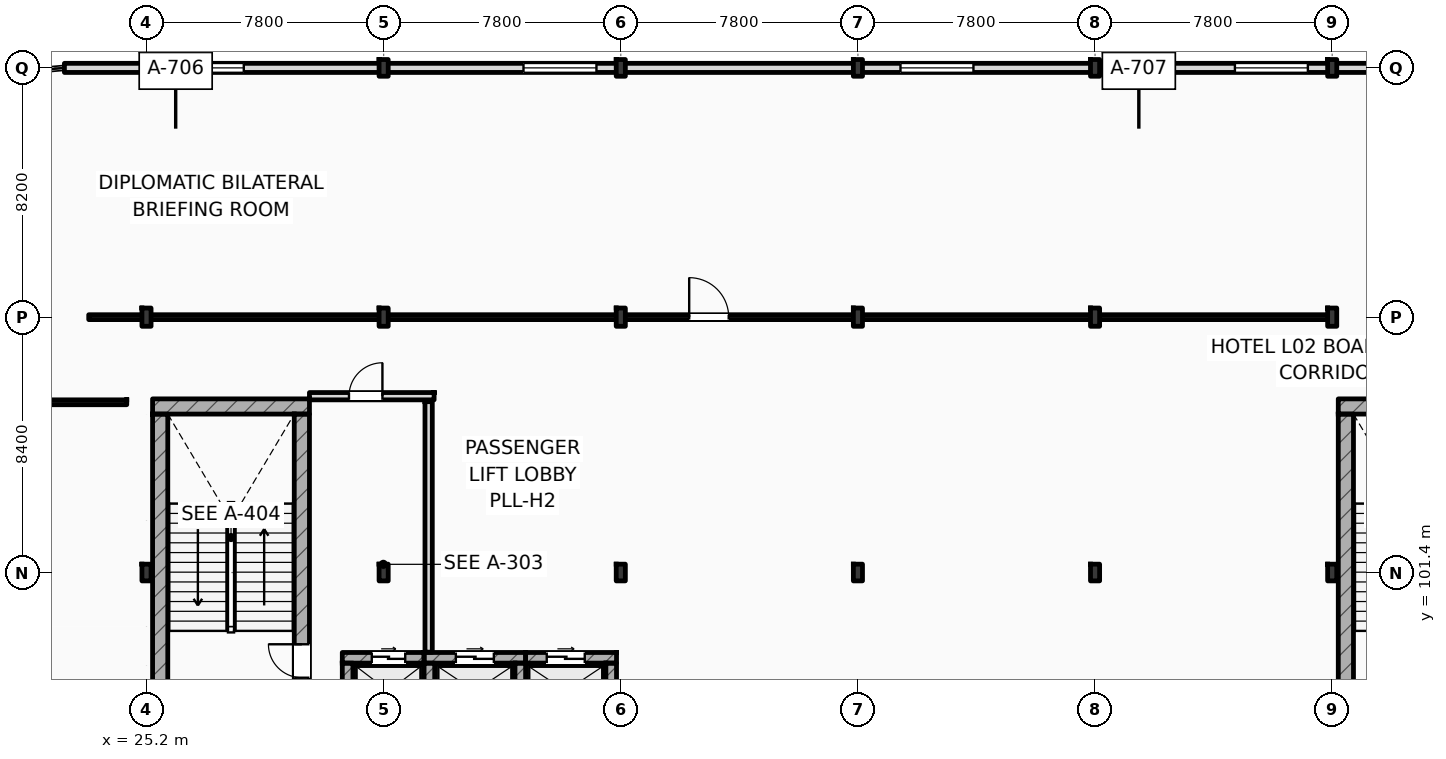
"""IFC4 building model, lengths in metres.
Left out: names, types, materials, properties, quantities, classifications, styles, units other than length and angle.
Written with IfcOpenShell. Run it as: python <this file> out.ifc"""

import sys

from ifc_helpers import new_model, si_unit, direction, frame, frame_2d, origin, origin_2d, place, context, subcontext, project, spatial, rectangle, i_section, extrude, element, fill, save


model = new_model("IFC4")
c1 = context("Model", 3, precision=1e-05, world=origin(), true_north=direction((0.0, 1.0)))
c2 = subcontext(c1, "Body", "Model", "MODEL_VIEW")
j1 = project(units=[si_unit("LENGTHUNIT", "METRE"), si_unit("PLANEANGLEUNIT", "RADIAN")], contexts=[c1])
p1 = place(None, origin())
s1 = spatial("IfcSite", under=j1, at=p1, CompositionType="ELEMENT")
p2 = place(p1, origin())
s2 = spatial("IfcBuilding", under=s1, at=p2, CompositionType="ELEMENT")
p3 = place(p2, frame((0.0, 0.0, 11.4)))
s3 = spatial("IfcBuildingStorey", under=s2, at=p3, CompositionType="ELEMENT", Elevation=11.4)
p4 = place(p3, frame((25.2, 101.4, 0.0), z_axis=(0.0, 0.0, 1.0), x_axis=(1.0, 0.0, 0.0)))
e1 = element("IfcColumn", 1, at=p4, inside=s3, PredefinedType="COLUMN", context=c2, shape_type="SweptSolid", body=[
    extrude(i_section(OverallWidth=0.3, OverallDepth=0.55, WebThickness=0.015, FlangeThickness=0.029, FilletRadius=0.027, at=origin_2d()), origin(), (0.0, 0.0, 1.0), 4.8),
])
p5 = place(p3, frame((25.2, 109.8, 0.0), z_axis=(0.0, 0.0, 1.0), x_axis=(1.0, 0.0, 0.0)))
e2 = element("IfcColumn", 2, at=p5, inside=s3, PredefinedType="COLUMN", context=c2, shape_type="SweptSolid", body=[
    extrude(i_section(OverallWidth=0.3, OverallDepth=0.6, WebThickness=0.015, FlangeThickness=0.03, FilletRadius=0.027, at=origin_2d()), origin(), (0.0, 0.0, 1.0), 4.8),
])
for number, where, z_axis, x_axis in (
    (3, (25.2, 118.0, 0.0), (0.0, 0.0, 1.0), (1.0, 0.0, 0.0)),
    (4, (33.0, 101.4, 0.0), (0.0, 0.0, 1.0), (1.0, 0.0, 0.0)),
):
    element("IfcColumn", number, at=place(p3, frame(where, z_axis=z_axis, x_axis=x_axis)), inside=s3, PredefinedType="COLUMN", context=c2, shape_type="SweptSolid", body=[
        extrude(i_section(OverallWidth=0.3, OverallDepth=0.55, WebThickness=0.015, FlangeThickness=0.029, FilletRadius=0.027, at=origin_2d()), origin(), (0.0, 0.0, 1.0), 4.8),
    ])
p6 = place(p3, frame((33.0, 109.8, 0.0), z_axis=(0.0, 0.0, 1.0), x_axis=(1.0, 0.0, 0.0)))
e5 = element("IfcColumn", 5, at=p6, inside=s3, PredefinedType="COLUMN", context=c2, shape_type="SweptSolid", body=[
    extrude(i_section(OverallWidth=0.3, OverallDepth=0.6, WebThickness=0.015, FlangeThickness=0.03, FilletRadius=0.027, at=origin_2d()), origin(), (0.0, 0.0, 1.0), 4.8),
])
for number, where, z_axis, x_axis in (
    (6, (33.0, 118.0, 0.0), (0.0, 0.0, 1.0), (1.0, 0.0, 0.0)),
    (7, (40.8, 101.4, 0.0), (0.0, 0.0, 1.0), (1.0, 0.0, 0.0)),
):
    element("IfcColumn", number, at=place(p3, frame(where, z_axis=z_axis, x_axis=x_axis)), inside=s3, PredefinedType="COLUMN", context=c2, shape_type="SweptSolid", body=[
        extrude(i_section(OverallWidth=0.3, OverallDepth=0.55, WebThickness=0.015, FlangeThickness=0.029, FilletRadius=0.027, at=origin_2d()), origin(), (0.0, 0.0, 1.0), 4.8),
    ])
p7 = place(p3, frame((40.8, 109.8, 0.0), z_axis=(0.0, 0.0, 1.0), x_axis=(1.0, 0.0, 0.0)))
e8 = element("IfcColumn", 8, at=p7, inside=s3, PredefinedType="COLUMN", context=c2, shape_type="SweptSolid", body=[
    extrude(i_section(OverallWidth=0.3, OverallDepth=0.6, WebThickness=0.015, FlangeThickness=0.03, FilletRadius=0.027, at=origin_2d()), origin(), (0.0, 0.0, 1.0), 4.8),
])
for number, where, z_axis, x_axis in (
    (9, (40.8, 118.0, 0.0), (0.0, 0.0, 1.0), (1.0, 0.0, 0.0)),
    (10, (48.6, 101.4, 0.0), (0.0, 0.0, 1.0), (1.0, 0.0, 0.0)),
):
    element("IfcColumn", number, at=place(p3, frame(where, z_axis=z_axis, x_axis=x_axis)), inside=s3, PredefinedType="COLUMN", context=c2, shape_type="SweptSolid", body=[
        extrude(i_section(OverallWidth=0.3, OverallDepth=0.55, WebThickness=0.015, FlangeThickness=0.029, FilletRadius=0.027, at=origin_2d()), origin(), (0.0, 0.0, 1.0), 4.8),
    ])
p8 = place(p3, frame((48.6, 109.8, 0.0), z_axis=(0.0, 0.0, 1.0), x_axis=(1.0, 0.0, 0.0)))
e11 = element("IfcColumn", 11, at=p8, inside=s3, PredefinedType="COLUMN", context=c2, shape_type="SweptSolid", body=[
    extrude(i_section(OverallWidth=0.3, OverallDepth=0.6, WebThickness=0.015, FlangeThickness=0.03, FilletRadius=0.027, at=origin_2d()), origin(), (0.0, 0.0, 1.0), 4.8),
])
for number, where, z_axis, x_axis in (
    (12, (48.6, 118.0, 0.0), (0.0, 0.0, 1.0), (1.0, 0.0, 0.0)),
    (13, (56.4, 101.4, 0.0), (0.0, 0.0, 1.0), (1.0, 0.0, 0.0)),
):
    element("IfcColumn", number, at=place(p3, frame(where, z_axis=z_axis, x_axis=x_axis)), inside=s3, PredefinedType="COLUMN", context=c2, shape_type="SweptSolid", body=[
        extrude(i_section(OverallWidth=0.3, OverallDepth=0.55, WebThickness=0.015, FlangeThickness=0.029, FilletRadius=0.027, at=origin_2d()), origin(), (0.0, 0.0, 1.0), 4.8),
    ])
p9 = place(p3, frame((56.4, 109.8, 0.0), z_axis=(0.0, 0.0, 1.0), x_axis=(1.0, 0.0, 0.0)))
e14 = element("IfcColumn", 14, at=p9, inside=s3, PredefinedType="COLUMN", context=c2, shape_type="SweptSolid", body=[
    extrude(i_section(OverallWidth=0.3, OverallDepth=0.6, WebThickness=0.015, FlangeThickness=0.03, FilletRadius=0.027, at=origin_2d()), origin(), (0.0, 0.0, 1.0), 4.8),
])
for number, where, z_axis, x_axis in (
    (15, (56.4, 118.0, 0.0), (0.0, 0.0, 1.0), (1.0, 0.0, 0.0)),
    (16, (64.2, 101.4, 0.0), (0.0, 0.0, 1.0), (1.0, 0.0, 0.0)),
):
    element("IfcColumn", number, at=place(p3, frame(where, z_axis=z_axis, x_axis=x_axis)), inside=s3, PredefinedType="COLUMN", context=c2, shape_type="SweptSolid", body=[
        extrude(i_section(OverallWidth=0.3, OverallDepth=0.55, WebThickness=0.015, FlangeThickness=0.029, FilletRadius=0.027, at=origin_2d()), origin(), (0.0, 0.0, 1.0), 4.8),
    ])
p10 = place(p3, frame((64.2, 109.8, 0.0), z_axis=(0.0, 0.0, 1.0), x_axis=(1.0, 0.0, 0.0)))
e17 = element("IfcColumn", 17, at=p10, inside=s3, PredefinedType="COLUMN", context=c2, shape_type="SweptSolid", body=[
    extrude(i_section(OverallWidth=0.3, OverallDepth=0.6, WebThickness=0.015, FlangeThickness=0.03, FilletRadius=0.027, at=origin_2d()), origin(), (0.0, 0.0, 1.0), 4.8),
])
p11 = place(p3, frame((64.2, 118.0, 0.0), z_axis=(0.0, 0.0, 1.0), x_axis=(1.0, 0.0, 0.0)))
e18 = element("IfcColumn", 18, at=p11, inside=s3, PredefinedType="COLUMN", context=c2, shape_type="SweptSolid", body=[
    extrude(i_section(OverallWidth=0.3, OverallDepth=0.55, WebThickness=0.015, FlangeThickness=0.029, FilletRadius=0.027, at=origin_2d()), origin(), (0.0, 0.0, 1.0), 4.8),
])
p12 = place(p3, frame((25.4, 106.862, 0.0), z_axis=(0.0, 0.0, 1.0), x_axis=(1.0, 0.0, 0.0)))
e19 = element("IfcWall", 19, at=p12, inside=s3, PredefinedType="SHEAR", context=c2, shape_type="SweptSolid", body=[
    extrude(rectangle(XDim=5.16, YDim=0.5, at=frame_2d((2.58, 0.0))), origin(), (0.0, 0.0, 1.0), 4.8),
])
p13 = place(p3, frame((25.65, 97.5, 0.0), z_axis=(0.0, 0.0, 1.0), x_axis=(0.0, 1.0, 0.0)))
e20 = element("IfcWall", 20, at=p13, inside=s3, PredefinedType="SHEAR", context=c2, shape_type="SweptSolid", body=[
    extrude(rectangle(XDim=9.112, YDim=0.5, at=frame_2d((4.556, 0.0))), origin(), (0.0, 0.0, 1.0), 4.8),
])
p14 = place(p3, frame((30.31, 97.5, 0.0), z_axis=(0.0, 0.0, 1.0), x_axis=(0.0, 1.0, 0.0)))
e21 = element("IfcWall", 21, at=p14, inside=s3, PredefinedType="SHEAR", context=c2, shape_type="SweptSolid", body=[
    extrude(rectangle(XDim=9.112, YDim=0.5, at=frame_2d((4.556, 0.0))), origin(), (0.0, 0.0, 1.0), 4.8),
])
p15 = place(p14, frame((0.44, 0.0, 0.0)))
e22 = element("IfcOpeningElement", 22, at=p15, cuts=e21, PredefinedType="OPENING", context=c2, shape_type="SweptSolid", body=[
    extrude(rectangle(XDim=1.1, YDim=2.2, at=frame_2d((0.55, 1.1))), frame((0.0, 0.26, 0.0), z_axis=(0.0, -1.0, 0.0), x_axis=(1.0, 0.0, 0.0)), (0.0, 0.0, 1.0), 0.52),
])
p16 = place(p3, frame((64.4, 106.862, 0.0), z_axis=(0.0, 0.0, 1.0), x_axis=(1.0, 0.0, 0.0)))
e23 = element("IfcWall", 23, at=p16, inside=s3, PredefinedType="SHEAR", context=c2, shape_type="SweptSolid", body=[
    extrude(rectangle(XDim=5.16, YDim=0.5, at=frame_2d((2.58, 0.0))), origin(), (0.0, 0.0, 1.0), 4.8),
])
p17 = place(p3, frame((64.65, 97.5, 0.0), z_axis=(0.0, 0.0, 1.0), x_axis=(0.0, 1.0, 0.0)))
e24 = element("IfcWall", 24, at=p17, inside=s3, PredefinedType="SHEAR", context=c2, shape_type="SweptSolid", body=[
    extrude(rectangle(XDim=9.112, YDim=0.5, at=frame_2d((4.556, 0.0))), origin(), (0.0, 0.0, 1.0), 4.8),
])
p18 = place(p3, frame((22.5, 118.0, 0.0), z_axis=(0.0, 0.0, 1.0), x_axis=(1.0, 0.0, 0.0)))
e25 = element("IfcWall", 25, at=p18, inside=s3, PredefinedType="STANDARD", context=c2, shape_type="SweptSolid", body=[
    extrude(rectangle(XDim=97.5, YDim=0.3, at=frame_2d((48.75, 0.0))), origin(), (0.0, 0.0, 1.0), 3.96),
])
p19 = place(p18, frame((3.5, 0.0, 0.95)))
e26 = element("IfcOpeningElement", 26, at=p19, cuts=e25, PredefinedType="OPENING", context=c2, shape_type="SweptSolid", body=[
    extrude(rectangle(XDim=2.4, YDim=2.4, at=frame_2d((1.2, 1.2))), frame((0.0, 0.16, 0.0), z_axis=(0.0, -1.0, 0.0), x_axis=(1.0, 0.0, 0.0)), (0.0, 0.0, 1.0), 0.32),
])
p20 = place(p18, frame((15.1, 0.0, 0.95)))
e27 = element("IfcOpeningElement", 27, at=p20, cuts=e25, PredefinedType="OPENING", context=c2, shape_type="SweptSolid", body=[
    extrude(rectangle(XDim=2.4, YDim=2.4, at=frame_2d((1.2, 1.2))), frame((0.0, 0.16, 0.0), z_axis=(0.0, -1.0, 0.0), x_axis=(1.0, 0.0, 0.0)), (0.0, 0.0, 1.0), 0.32),
])
p21 = place(p18, frame((27.5, 0.0, 0.95)))
e28 = element("IfcOpeningElement", 28, at=p21, cuts=e25, PredefinedType="OPENING", context=c2, shape_type="SweptSolid", body=[
    extrude(rectangle(XDim=2.4, YDim=2.4, at=frame_2d((1.2, 1.2))), frame((0.0, 0.16, 0.0), z_axis=(0.0, -1.0, 0.0), x_axis=(1.0, 0.0, 0.0)), (0.0, 0.0, 1.0), 0.32),
])
p22 = place(p18, frame((38.5, 0.0, 0.95)))
e29 = element("IfcOpeningElement", 29, at=p22, cuts=e25, PredefinedType="OPENING", context=c2, shape_type="SweptSolid", body=[
    extrude(rectangle(XDim=2.4, YDim=2.4, at=frame_2d((1.2, 1.2))), frame((0.0, 0.16, 0.0), z_axis=(0.0, -1.0, 0.0), x_axis=(1.0, 0.0, 0.0)), (0.0, 0.0, 1.0), 0.32),
])
p23 = place(p18, frame((51.5, 0.0, 0.95)))
e30 = element("IfcOpeningElement", 30, at=p23, cuts=e25, PredefinedType="OPENING", context=c2, shape_type="SweptSolid", body=[
    extrude(rectangle(XDim=2.4, YDim=2.4, at=frame_2d((1.2, 1.2))), frame((0.0, 0.16, 0.0), z_axis=(0.0, -1.0, 0.0), x_axis=(1.0, 0.0, 0.0)), (0.0, 0.0, 1.0), 0.32),
])
p24 = place(p18, frame((61.9, 0.0, 0.95)))
e31 = element("IfcOpeningElement", 31, at=p24, cuts=e25, PredefinedType="OPENING", context=c2, shape_type="SweptSolid", body=[
    extrude(rectangle(XDim=2.4, YDim=2.4, at=frame_2d((1.2, 1.2))), frame((0.0, 0.16, 0.0), z_axis=(0.0, -1.0, 0.0), x_axis=(1.0, 0.0, 0.0)), (0.0, 0.0, 1.0), 0.32),
])
p25 = place(p18, frame((75.5, 0.0, 0.95)))
e32 = element("IfcOpeningElement", 32, at=p25, cuts=e25, PredefinedType="OPENING", context=c2, shape_type="SweptSolid", body=[
    extrude(rectangle(XDim=2.4, YDim=2.4, at=frame_2d((1.2, 1.2))), frame((0.0, 0.16, 0.0), z_axis=(0.0, -1.0, 0.0), x_axis=(1.0, 0.0, 0.0)), (0.0, 0.0, 1.0), 0.32),
])
p26 = place(p18, frame((85.9, 0.0, 0.95)))
e33 = element("IfcOpeningElement", 33, at=p26, cuts=e25, PredefinedType="OPENING", context=c2, shape_type="SweptSolid", body=[
    extrude(rectangle(XDim=2.4, YDim=2.4, at=frame_2d((1.2, 1.2))), frame((0.0, 0.16, 0.0), z_axis=(0.0, -1.0, 0.0), x_axis=(1.0, 0.0, 0.0)), (0.0, 0.0, 1.0), 0.32),
])
p27 = place(p3, frame((31.64, 98.595, 0.0), z_axis=(0.0, 0.0, 1.0), x_axis=(1.0, 0.0, 0.0)))
e34 = element("IfcWall", 34, at=p27, inside=s3, PredefinedType="SHEAR", context=c2, shape_type="SweptSolid", body=[
    extrude(rectangle(XDim=2.69, YDim=0.35, at=frame_2d((1.345, 0.0))), origin(), (0.0, 0.0, 1.0), 4.52),
])
p28 = place(p27, frame((0.97, 0.0, 0.0)))
e35 = element("IfcOpeningElement", 35, at=p28, cuts=e34, PredefinedType="OPENING", context=c2, shape_type="SweptSolid", body=[
    extrude(rectangle(XDim=1.1, YDim=2.2, at=frame_2d((0.55, 1.1))), frame((0.0, 0.185, 0.0), z_axis=(0.0, -1.0, 0.0), x_axis=(1.0, 0.0, 0.0)), (0.0, 0.0, 1.0), 0.37),
])
p29 = place(p3, frame((31.815, 96.58, 0.0), z_axis=(0.0, 0.0, 1.0), x_axis=(0.0, 1.0, 0.0)))
e36 = element("IfcWall", 36, at=p29, inside=s3, PredefinedType="SHEAR", context=c2, shape_type="SweptSolid", body=[
    extrude(rectangle(XDim=1.84, YDim=0.35, at=frame_2d((0.92, 0.0))), origin(), (0.0, 0.0, 1.0), 4.52),
])
p30 = place(p3, frame((34.33, 98.595, 0.0), z_axis=(0.0, 0.0, 1.0), x_axis=(1.0, 0.0, 0.0)))
e37 = element("IfcWall", 37, at=p30, inside=s3, PredefinedType="SHEAR", context=c2, shape_type="SweptSolid", body=[
    extrude(rectangle(XDim=3.34, YDim=0.35, at=frame_2d((1.67, 0.0))), origin(), (0.0, 0.0, 1.0), 4.52),
])
p31 = place(p30, frame((1.045, 0.0, 0.0)))
e38 = element("IfcOpeningElement", 38, at=p31, cuts=e37, PredefinedType="OPENING", context=c2, shape_type="SweptSolid", body=[
    extrude(rectangle(XDim=1.25, YDim=2.25, at=frame_2d((0.625, 1.125))), frame((0.0, 0.185, 0.0), z_axis=(0.0, -1.0, 0.0), x_axis=(1.0, 0.0, 0.0)), (0.0, 0.0, 1.0), 0.37),
])
for number, where, z_axis, x_axis in (
    (39, (34.505, 96.58, 0.0), (0.0, 0.0, 1.0), (0.0, 1.0, 0.0)),
    (40, (37.495, 96.58, 0.0), (0.0, 0.0, 1.0), (0.0, 1.0, 0.0)),
):
    element("IfcWall", number, at=place(p3, frame(where, z_axis=z_axis, x_axis=x_axis)), inside=s3, PredefinedType="SHEAR", context=c2, shape_type="SweptSolid", body=[
        extrude(rectangle(XDim=1.84, YDim=0.35, at=frame_2d((0.92, 0.0))), origin(), (0.0, 0.0, 1.0), 4.52),
    ])
p32 = place(p3, frame((37.67, 98.595, 0.0), z_axis=(0.0, 0.0, 1.0), x_axis=(1.0, 0.0, 0.0)))
e41 = element("IfcWall", 41, at=p32, inside=s3, PredefinedType="SHEAR", context=c2, shape_type="SweptSolid", body=[
    extrude(rectangle(XDim=2.99, YDim=0.35, at=frame_2d((1.495, 0.0))), origin(), (0.0, 0.0, 1.0), 4.52),
])
p33 = place(p32, frame((0.695, 0.0, 0.0)))
e42 = element("IfcOpeningElement", 42, at=p33, cuts=e41, PredefinedType="OPENING", context=c2, shape_type="SweptSolid", body=[
    extrude(rectangle(XDim=1.25, YDim=2.25, at=frame_2d((0.625, 1.125))), frame((0.0, 0.185, 0.0), z_axis=(0.0, -1.0, 0.0), x_axis=(1.0, 0.0, 0.0)), (0.0, 0.0, 1.0), 0.37),
])
p34 = place(p3, frame((40.485, 96.58, 0.0), z_axis=(0.0, 0.0, 1.0), x_axis=(0.0, 1.0, 0.0)))
e43 = element("IfcWall", 43, at=p34, inside=s3, PredefinedType="SHEAR", context=c2, shape_type="SweptSolid", body=[
    extrude(rectangle(XDim=1.84, YDim=0.35, at=frame_2d((0.92, 0.0))), origin(), (0.0, 0.0, 1.0), 4.11),
])
p35 = place(p3, frame((34.48, 98.78, 0.0), z_axis=(0.0, 0.0, 1.0), x_axis=(0.0, 1.0, 0.0)))
e44 = element("IfcWall", 44, at=p35, inside=s3, PredefinedType="STANDARD", context=c2, shape_type="SweptSolid", body=[
    extrude(rectangle(XDim=8.24, YDim=0.24, at=frame_2d((4.12, 0.0))), origin(), (0.0, 0.0, 1.0), 4.52),
])
p36 = place(p3, frame((30.56, 107.2, 0.0), z_axis=(0.0, 0.0, 1.0), x_axis=(1.0, 0.0, 0.0)))
e45 = element("IfcWall", 45, at=p36, inside=s3, PredefinedType="STANDARD", context=c2, shape_type="SweptSolid", body=[
    extrude(rectangle(XDim=4.1, YDim=0.24, at=frame_2d((2.05, 0.0))), origin(), (0.0, 0.0, 1.0), 4.52),
])
p37 = place(p36, frame((1.3, 0.0, 0.0)))
e46 = element("IfcOpeningElement", 46, at=p37, cuts=e45, PredefinedType="OPENING", context=c2, shape_type="SweptSolid", body=[
    extrude(rectangle(XDim=1.1, YDim=2.2, at=frame_2d((0.55, 1.1))), frame((0.0, 0.13, 0.0), z_axis=(0.0, -1.0, 0.0), x_axis=(1.0, 0.0, 0.0)), (0.0, 0.0, 1.0), 0.26),
])
p38 = place(p3, frame((23.3, 109.8, 0.0), z_axis=(0.0, 0.0, 1.0), x_axis=(1.0, 0.0, 0.0)))
e47 = element("IfcWall", 47, at=p38, inside=s3, PredefinedType="PARTITIONING", context=c2, shape_type="SweptSolid", body=[
    extrude(rectangle(XDim=40.8, YDim=0.16, at=frame_2d((20.4, 0.0))), origin(), (0.0, 0.0, 1.0), 3.96),
])
p39 = place(p38, frame((19.75, 0.0, 0.0)))
e48 = element("IfcOpeningElement", 48, at=p39, cuts=e47, PredefinedType="OPENING", context=c2, shape_type="SweptSolid", body=[
    extrude(rectangle(XDim=1.3, YDim=2.2, at=frame_2d((0.65, 1.1))), frame((0.0, 0.09, 0.0), z_axis=(0.0, -1.0, 0.0), x_axis=(1.0, 0.0, 0.0)), (0.0, 0.0, 1.0), 0.18),
])
p40 = place(p3, frame((11.25, 107.0, 0.0), z_axis=(0.0, 0.0, 1.0), x_axis=(1.0, 0.0, 0.0)))
e49 = element("IfcWall", 49, at=p40, inside=s3, PredefinedType="PARTITIONING", context=c2, shape_type="SweptSolid", body=[
    extrude(rectangle(XDim=13.3, YDim=0.16, at=frame_2d((6.65, 0.0))), origin(), (0.0, 0.0, 1.0), 4.52),
])
p41 = place(p40, frame((6.0, 0.0, 0.0)))
e50 = element("IfcOpeningElement", 50, at=p41, cuts=e49, PredefinedType="OPENING", context=c2, shape_type="SweptSolid", body=[
    extrude(rectangle(XDim=1.3, YDim=2.2, at=frame_2d((0.65, 1.1))), frame((0.0, 0.09, 0.0), z_axis=(0.0, -1.0, 0.0), x_axis=(1.0, 0.0, 0.0)), (0.0, 0.0, 1.0), 0.18),
])
p42 = place(p19, origin())
e51 = element("IfcWindow", 51, at=p42, inside=s3, PartitioningType="DOUBLE_PANEL_VERTICAL", PredefinedType="WINDOW", context=c2, shape_type="SweptSolid", body=[
    extrude(rectangle(XDim=2.4, YDim=2.4, at=frame_2d((1.2, 1.2))), frame((0.0, 0.03, 0.0), z_axis=(0.0, -1.0, 0.0), x_axis=(1.0, 0.0, 0.0)), (0.0, 0.0, 1.0), 0.06),
])
fill(e26, e51)
p43 = place(p20, origin())
e52 = element("IfcWindow", 52, at=p43, inside=s3, PartitioningType="DOUBLE_PANEL_VERTICAL", PredefinedType="WINDOW", context=c2, shape_type="SweptSolid", body=[
    extrude(rectangle(XDim=2.4, YDim=2.4, at=frame_2d((1.2, 1.2))), frame((0.0, 0.03, 0.0), z_axis=(0.0, -1.0, 0.0), x_axis=(1.0, 0.0, 0.0)), (0.0, 0.0, 1.0), 0.06),
])
fill(e27, e52)
p44 = place(p21, origin())
e53 = element("IfcWindow", 53, at=p44, inside=s3, PartitioningType="DOUBLE_PANEL_VERTICAL", PredefinedType="WINDOW", context=c2, shape_type="SweptSolid", body=[
    extrude(rectangle(XDim=2.4, YDim=2.4, at=frame_2d((1.2, 1.2))), frame((0.0, 0.03, 0.0), z_axis=(0.0, -1.0, 0.0), x_axis=(1.0, 0.0, 0.0)), (0.0, 0.0, 1.0), 0.06),
])
fill(e28, e53)
p45 = place(p22, origin())
e54 = element("IfcWindow", 54, at=p45, inside=s3, PartitioningType="DOUBLE_PANEL_VERTICAL", PredefinedType="WINDOW", context=c2, shape_type="SweptSolid", body=[
    extrude(rectangle(XDim=2.4, YDim=2.4, at=frame_2d((1.2, 1.2))), frame((0.0, 0.03, 0.0), z_axis=(0.0, -1.0, 0.0), x_axis=(1.0, 0.0, 0.0)), (0.0, 0.0, 1.0), 0.06),
])
fill(e29, e54)
p46 = place(p15, origin())
e55 = element("IfcDoor", 55, at=p46, inside=s3, OperationType="SINGLE_SWING_RIGHT", PredefinedType="DOOR", context=c2, shape_type="SweptSolid", body=[
    extrude(rectangle(XDim=1.1, YDim=2.2, at=frame_2d((0.55, 1.1))), frame((0.0, 0.025, 0.0), z_axis=(0.0, -1.0, 0.0), x_axis=(1.0, 0.0, 0.0)), (0.0, 0.0, 1.0), 0.05),
])
fill(e22, e55)
p47 = place(p28, origin())
e56 = element("IfcDoor", 56, at=p47, inside=s3, OperationType="SLIDING_TO_LEFT", PredefinedType="DOOR", context=c2, shape_type="SweptSolid", body=[
    extrude(rectangle(XDim=1.1, YDim=2.2, at=frame_2d((0.55, 1.1))), frame((0.0, 0.025, 0.0), z_axis=(0.0, -1.0, 0.0), x_axis=(1.0, 0.0, 0.0)), (0.0, 0.0, 1.0), 0.05),
])
fill(e35, e56)
p48 = place(p31, origin())
e57 = element("IfcDoor", 57, at=p48, inside=s3, OperationType="SLIDING_TO_LEFT", PredefinedType="DOOR", context=c2, shape_type="SweptSolid", body=[
    extrude(rectangle(XDim=1.25, YDim=2.25, at=frame_2d((0.625, 1.125))), frame((0.0, 0.025, 0.0), z_axis=(0.0, -1.0, 0.0), x_axis=(1.0, 0.0, 0.0)), (0.0, 0.0, 1.0), 0.05),
])
fill(e38, e57)
p49 = place(p33, origin())
e58 = element("IfcDoor", 58, at=p49, inside=s3, OperationType="SLIDING_TO_LEFT", PredefinedType="DOOR", context=c2, shape_type="SweptSolid", body=[
    extrude(rectangle(XDim=1.25, YDim=2.25, at=frame_2d((0.625, 1.125))), frame((0.0, 0.025, 0.0), z_axis=(0.0, -1.0, 0.0), x_axis=(1.0, 0.0, 0.0)), (0.0, 0.0, 1.0), 0.05),
])
fill(e42, e58)
p50 = place(p37, origin())
e59 = element("IfcDoor", 59, at=p50, inside=s3, OperationType="SINGLE_SWING_RIGHT", PredefinedType="DOOR", context=c2, shape_type="SweptSolid", body=[
    extrude(rectangle(XDim=1.1, YDim=2.2, at=frame_2d((0.55, 1.1))), frame((0.0, 0.025, 0.0), z_axis=(0.0, -1.0, 0.0), x_axis=(1.0, 0.0, 0.0)), (0.0, 0.0, 1.0), 0.05),
])
fill(e46, e59)
p51 = place(p39, origin())
e60 = element("IfcDoor", 60, at=p51, inside=s3, OperationType="SINGLE_SWING_LEFT", PredefinedType="DOOR", context=c2, shape_type="SweptSolid", body=[
    extrude(rectangle(XDim=1.3, YDim=2.2, at=frame_2d((0.65, 1.1))), frame((0.0, 0.025, 0.0), z_axis=(0.0, -1.0, 0.0), x_axis=(1.0, 0.0, 0.0)), (0.0, 0.0, 1.0), 0.05),
])
fill(e48, e60)
save(model, sys.argv[1])
